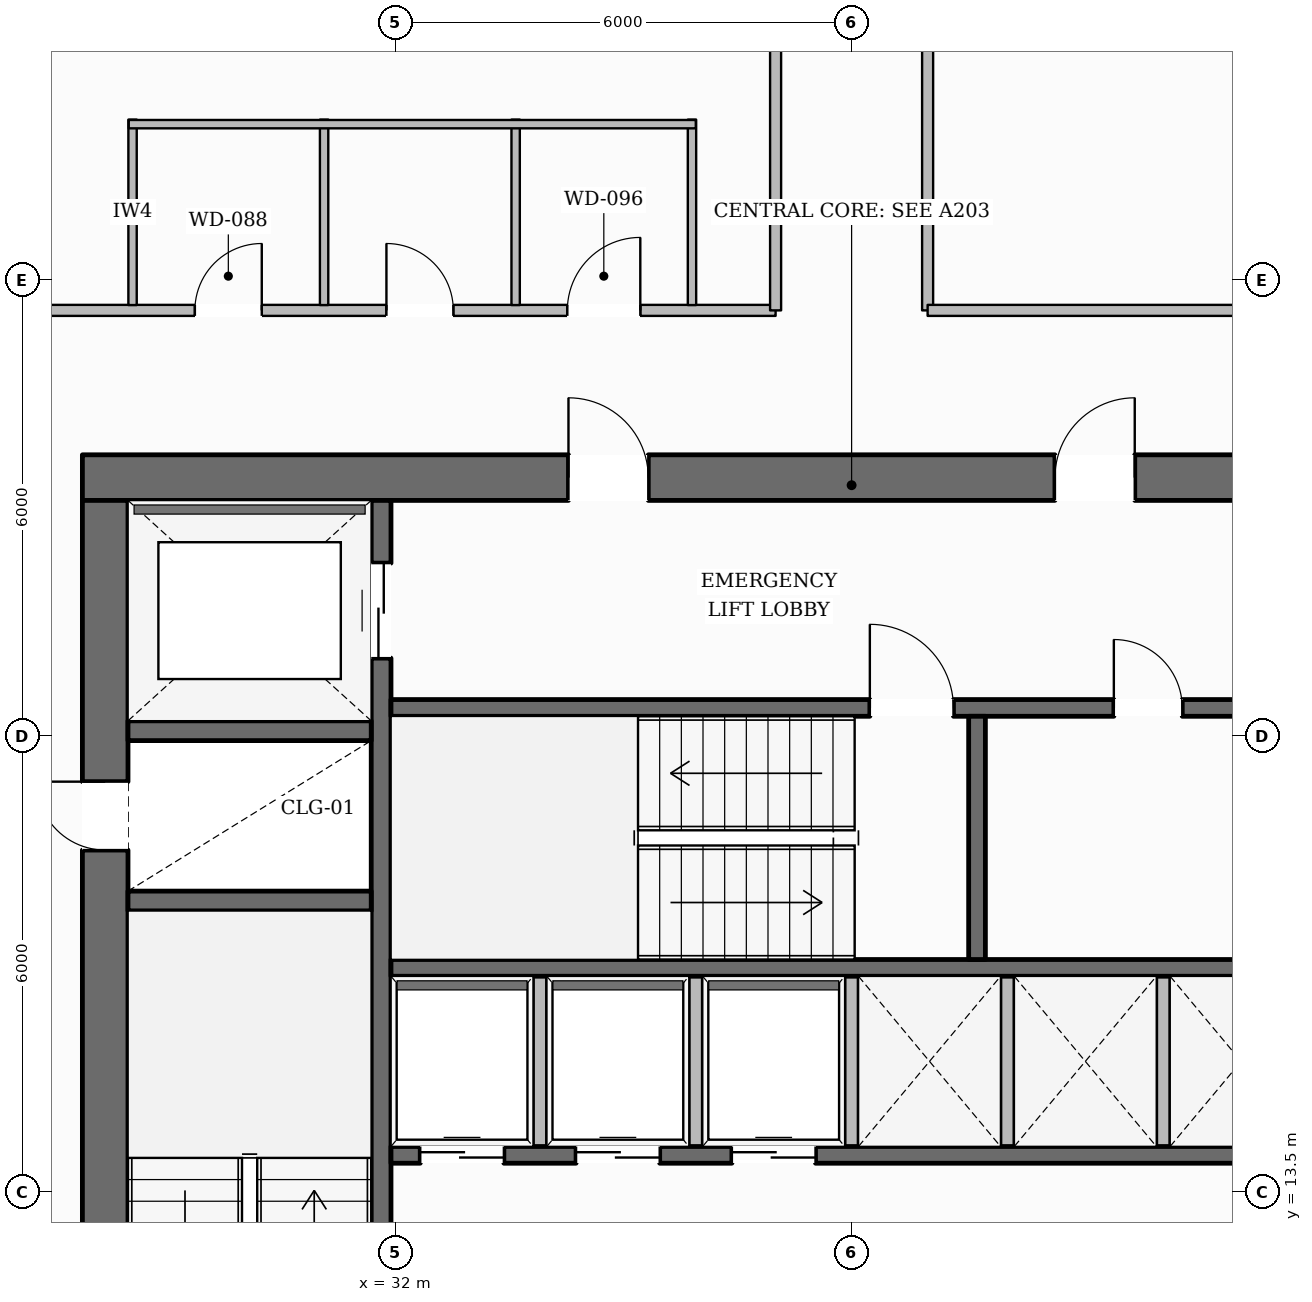
"""IFC4 building model, lengths in metres.
Left out: names, types, materials, properties, quantities, classifications, styles, units other than length and angle.
Written with IfcOpenShell. Run it as: python <this file> out.ifc"""

import sys

from ifc_helpers import new_model, si_unit, direction, frame, frame_2d, origin, place, context, subcontext, project, spatial, rectangle, extrude, element, fill, save


model = new_model("IFC4")
c1 = context("Model", 3, precision=1e-05, world=origin(), true_north=direction((0.0, 1.0)))
c2 = subcontext(c1, "Body", "Model", "MODEL_VIEW")
j1 = project(units=[si_unit("LENGTHUNIT", "METRE"), si_unit("PLANEANGLEUNIT", "RADIAN")], contexts=[c1])
p1 = place(None, origin())
s1 = spatial("IfcSite", under=j1, at=p1, CompositionType="ELEMENT")
p2 = place(p1, origin())
s2 = spatial("IfcBuilding", under=s1, at=p2, CompositionType="ELEMENT")
p3 = place(p2, frame((0.0, 0.0, 63.75)))
s3 = spatial("IfcBuildingStorey", under=s2, at=p3, CompositionType="ELEMENT", Elevation=63.75)
p4 = place(p3, frame((27.88, 22.9, 0.0), z_axis=(0.0, 0.0, 1.0), x_axis=(1.0, 0.0, 0.0)))
e1 = element("IfcWall", 1, at=p4, inside=s3, PredefinedType="SOLIDWALL", context=c2, shape_type="SweptSolid", body=[
    extrude(rectangle(XDim=20.24, YDim=0.6, at=frame_2d((10.12, 0.0))), origin(), (0.0, 0.0, 1.0), 3.59),
])
p5 = place(p4, frame((6.395, 0.0, 0.0)))
e2 = element("IfcOpeningElement", 2, at=p5, cuts=e1, PredefinedType="OPENING", context=c2, shape_type="SweptSolid", body=[
    extrude(rectangle(XDim=1.05, YDim=2.15, at=frame_2d((0.525, 1.075))), frame((0.0, 0.31, 0.0), z_axis=(0.0, -1.0, 0.0), x_axis=(1.0, 0.0, 0.0)), (0.0, 0.0, 1.0), 0.62),
])
p6 = place(p4, frame((12.795, 0.0, 0.0)))
e3 = element("IfcOpeningElement", 3, at=p6, cuts=e1, PredefinedType="OPENING", context=c2, shape_type="SweptSolid", body=[
    extrude(rectangle(XDim=1.05, YDim=2.15, at=frame_2d((0.525, 1.075))), frame((0.0, 0.31, 0.0), z_axis=(0.0, -1.0, 0.0), x_axis=(1.0, 0.0, 0.0)), (0.0, 0.0, 1.0), 0.62),
])
p7 = place(p3, frame((28.18, 9.6, 0.0), z_axis=(0.0, 0.0, 1.0), x_axis=(0.0, 1.0, 0.0)))
e4 = element("IfcWall", 4, at=p7, inside=s3, PredefinedType="SOLIDWALL", context=c2, shape_type="SweptSolid", body=[
    extrude(rectangle(XDim=13.0, YDim=0.6, at=frame_2d((6.5, 0.0))), origin(), (0.0, 0.0, 1.0), 3.59),
])
p8 = place(p7, frame((0.2, 0.0, 0.0)))
e5 = element("IfcOpeningElement", 5, at=p8, cuts=e4, PredefinedType="OPENING", context=c2, shape_type="SweptSolid", body=[
    extrude(rectangle(XDim=1.1, YDim=2.15, at=frame_2d((0.55, 1.075))), frame((0.0, 0.31, 0.0), z_axis=(0.0, -1.0, 0.0), x_axis=(1.0, 0.0, 0.0)), (0.0, 0.0, 1.0), 0.62),
])
p9 = place(p7, frame((8.4, 0.0, 0.0)))
e6 = element("IfcOpeningElement", 6, at=p9, cuts=e4, PredefinedType="OPENING", context=c2, shape_type="SweptSolid", body=[
    extrude(rectangle(XDim=0.9, YDim=2.1, at=frame_2d((0.45, 1.05))), frame((0.0, 0.31, 0.0), z_axis=(0.0, -1.0, 0.0), x_axis=(1.0, 0.0, 0.0)), (0.0, 0.0, 1.0), 0.62),
])
p10 = place(p3, frame((31.81, 9.6, 0.0), z_axis=(0.0, 0.0, 1.0), x_axis=(0.0, 1.0, 0.0)))
e7 = element("IfcWall", 7, at=p10, inside=s3, PredefinedType="SHEAR", context=c2, shape_type="SweptSolid", body=[
    extrude(rectangle(XDim=13.0, YDim=0.26, at=frame_2d((6.5, 0.0))), origin(), (0.0, 0.0, 1.0), 3.59),
])
p11 = place(p10, frame((10.925, 0.0, 0.0)))
e8 = element("IfcOpeningElement", 8, at=p11, cuts=e7, PredefinedType="OPENING", context=c2, shape_type="SweptSolid", body=[
    extrude(rectangle(XDim=1.25, YDim=2.25, at=frame_2d((0.625, 1.125))), frame((0.0, 0.14, 0.0), z_axis=(0.0, -1.0, 0.0), x_axis=(1.0, 0.0, 0.0)), (0.0, 0.0, 1.0), 0.28),
])
for number, where, z_axis, x_axis in (
    (9, (28.48, 17.33, 0.0), (0.0, 0.0, 1.0), (1.0, 0.0, 0.0)),
    (10, (28.48, 19.57, 0.0), (0.0, 0.0, 1.0), (1.0, 0.0, 0.0)),
):
    element("IfcWall", number, at=place(p3, frame(where, z_axis=z_axis, x_axis=x_axis)), inside=s3, PredefinedType="SHEAR", context=c2, shape_type="SweptSolid", body=[
        extrude(rectangle(XDim=3.2, YDim=0.26, at=frame_2d((1.6, 0.0))), origin(), (0.0, 0.0, 1.0), 3.59),
    ])
p12 = place(p3, frame((31.94, 19.87, 0.0), z_axis=(0.0, 0.0, 1.0), x_axis=(1.0, 0.0, 0.0)))
e11 = element("IfcWall", 11, at=p12, inside=s3, PredefinedType="SOLIDWALL", context=c2, shape_type="SweptSolid", body=[
    extrude(rectangle(XDim=12.12, YDim=0.22, at=frame_2d((6.06, 0.0))), origin(), (0.0, 0.0, 1.0), 3.59),
])
p13 = place(p12, frame((6.3, 0.0, 0.0)))
e12 = element("IfcOpeningElement", 12, at=p13, cuts=e11, PredefinedType="OPENING", context=c2, shape_type="SweptSolid", body=[
    extrude(rectangle(XDim=1.1, YDim=2.15, at=frame_2d((0.55, 1.075))), frame((0.0, 0.12, 0.0), z_axis=(0.0, -1.0, 0.0), x_axis=(1.0, 0.0, 0.0)), (0.0, 0.0, 1.0), 0.24),
])
p14 = place(p12, frame((9.51, 0.0, 0.0)))
e13 = element("IfcOpeningElement", 13, at=p14, cuts=e11, PredefinedType="OPENING", context=c2, shape_type="SweptSolid", body=[
    extrude(rectangle(XDim=0.9, YDim=2.1, at=frame_2d((0.45, 1.05))), frame((0.0, 0.12, 0.0), z_axis=(0.0, -1.0, 0.0), x_axis=(1.0, 0.0, 0.0)), (0.0, 0.0, 1.0), 0.24),
])
p15 = place(p3, frame((31.94, 16.45, 0.0), z_axis=(0.0, 0.0, 1.0), x_axis=(1.0, 0.0, 0.0)))
e14 = element("IfcWall", 14, at=p15, inside=s3, PredefinedType="SOLIDWALL", context=c2, shape_type="SweptSolid", body=[
    extrude(rectangle(XDim=12.12, YDim=0.22, at=frame_2d((6.06, 0.0))), origin(), (0.0, 0.0, 1.0), 3.59),
])
p16 = place(p3, frame((39.65, 16.56, 0.0), z_axis=(0.0, 0.0, 1.0), x_axis=(0.0, 1.0, 0.0)))
e15 = element("IfcWall", 15, at=p16, inside=s3, PredefinedType="SOLIDWALL", context=c2, shape_type="SweptSolid", body=[
    extrude(rectangle(XDim=3.2, YDim=0.22, at=frame_2d((1.6, 0.0))), origin(), (0.0, 0.0, 1.0), 3.59),
])
p17 = place(p3, frame((31.94, 13.99, 0.0), z_axis=(0.0, 0.0, 1.0), x_axis=(1.0, 0.0, 0.0)))
e16 = element("IfcWall", 16, at=p17, inside=s3, PredefinedType="SOLIDWALL", context=c2, shape_type="SweptSolid", body=[
    extrude(rectangle(XDim=12.12, YDim=0.22, at=frame_2d((6.06, 0.0))), origin(), (0.0, 0.0, 1.0), 3.59),
])
p18 = place(p17, frame((0.385, 0.0, 0.0)))
e17 = element("IfcOpeningElement", 17, at=p18, cuts=e16, PredefinedType="OPENING", context=c2, shape_type="SweptSolid", body=[
    extrude(rectangle(XDim=1.1, YDim=2.2, at=frame_2d((0.55, 1.1))), frame((0.0, 0.12, 0.0), z_axis=(0.0, -1.0, 0.0), x_axis=(1.0, 0.0, 0.0)), (0.0, 0.0, 1.0), 0.24),
])
p19 = place(p17, frame((2.435, 0.0, 0.0)))
e18 = element("IfcOpeningElement", 18, at=p19, cuts=e16, PredefinedType="OPENING", context=c2, shape_type="SweptSolid", body=[
    extrude(rectangle(XDim=1.1, YDim=2.2, at=frame_2d((0.55, 1.1))), frame((0.0, 0.12, 0.0), z_axis=(0.0, -1.0, 0.0), x_axis=(1.0, 0.0, 0.0)), (0.0, 0.0, 1.0), 0.24),
])
p20 = place(p17, frame((4.485, 0.0, 0.0)))
e19 = element("IfcOpeningElement", 19, at=p20, cuts=e16, PredefinedType="OPENING", context=c2, shape_type="SweptSolid", body=[
    extrude(rectangle(XDim=1.1, YDim=2.2, at=frame_2d((0.55, 1.1))), frame((0.0, 0.12, 0.0), z_axis=(0.0, -1.0, 0.0), x_axis=(1.0, 0.0, 0.0)), (0.0, 0.0, 1.0), 0.24),
])
p21 = place(p3, frame((12.6, 13.478, 0.0), z_axis=(0.0, 0.0, 1.0), x_axis=(0.505426781382, 0.862869496889, 0.0)))
e20 = element("IfcWall", 20, at=p21, inside=s3, PredefinedType="STANDARD", context=c2, shape_type="SweptSolid", body=[
    extrude(rectangle(XDim=35.985, YDim=0.38, at=frame_2d((17.992, 0.0))), origin(), (0.0, 0.0, 1.0), 2.97),
])
p22 = place(p21, frame((31.766, 0.0, 0.65)))
e21 = element("IfcOpeningElement", 21, at=p22, cuts=e20, PredefinedType="OPENING", context=c2, shape_type="SweptSolid", body=[
    extrude(rectangle(XDim=1.65, YDim=1.75, at=frame_2d((0.825, 0.875))), frame((0.0, 0.2, 0.0), z_axis=(0.0, -1.0, 0.0), x_axis=(1.0, 0.0, 0.0)), (0.0, 0.0, 1.0), 0.4),
])
p23 = place(p21, frame((25.928, 0.0, 0.65)))
e22 = element("IfcOpeningElement", 22, at=p23, cuts=e20, PredefinedType="OPENING", context=c2, shape_type="SweptSolid", body=[
    extrude(rectangle(XDim=1.65, YDim=1.75, at=frame_2d((0.825, 0.875))), frame((0.0, 0.2, 0.0), z_axis=(0.0, -1.0, 0.0), x_axis=(1.0, 0.0, 0.0)), (0.0, 0.0, 1.0), 0.4),
])
p24 = place(p21, frame((8.413, 0.0, 0.65)))
e23 = element("IfcOpeningElement", 23, at=p24, cuts=e20, PredefinedType="OPENING", context=c2, shape_type="SweptSolid", body=[
    extrude(rectangle(XDim=1.65, YDim=1.75, at=frame_2d((0.825, 0.875))), frame((0.0, 0.2, 0.0), z_axis=(0.0, -1.0, 0.0), x_axis=(1.0, 0.0, 0.0)), (0.0, 0.0, 1.0), 0.4),
])
p25 = place(p21, frame((2.574, 0.0, 0.65)))
e24 = element("IfcOpeningElement", 24, at=p25, cuts=e20, PredefinedType="OPENING", context=c2, shape_type="SweptSolid", body=[
    extrude(rectangle(XDim=1.65, YDim=1.75, at=frame_2d((0.825, 0.875))), frame((0.0, 0.2, 0.0), z_axis=(0.0, -1.0, 0.0), x_axis=(1.0, 0.0, 0.0)), (0.0, 0.0, 1.0), 0.4),
])
for number, where, z_axis, x_axis in (
    (25, (33.9, 14.1, 0.0), (0.0, 0.0, 1.0), (0.0, 1.0, 0.0)),
    (26, (35.95, 14.1, 0.0), (0.0, 0.0, 1.0), (0.0, 1.0, 0.0)),
    (27, (38.0, 14.1, 0.0), (0.0, 0.0, 1.0), (0.0, 1.0, 0.0)),
    (28, (40.05, 14.1, 0.0), (0.0, 0.0, 1.0), (0.0, 1.0, 0.0)),
    (29, (42.1, 14.1, 0.0), (0.0, 0.0, 1.0), (0.0, 1.0, 0.0)),
):
    element("IfcWall", number, at=place(p3, frame(where, z_axis=z_axis, x_axis=x_axis)), inside=s3, PredefinedType="PARTITIONING", context=c2, shape_type="SweptSolid", body=[
        extrude(rectangle(XDim=2.24, YDim=0.165, at=frame_2d((1.12, 0.0))), origin(), (0.0, 0.0, 1.0), 3.59),
    ])
p26 = place(p3, frame((25.98, 25.1, 0.0), z_axis=(0.0, 0.0, 1.0), x_axis=(1.0, 0.0, 0.0)))
e30 = element("IfcWall", 30, at=p26, inside=s3, PredefinedType="PARTITIONING", context=c2, shape_type="SweptSolid", body=[
    extrude(rectangle(XDim=11.02, YDim=0.145, at=frame_2d((5.51, 0.0))), origin(), (0.0, 0.0, 1.0), 3.59),
])
p27 = place(p26, frame((3.38, 0.0, 0.0)))
e31 = element("IfcOpeningElement", 31, at=p27, cuts=e30, PredefinedType="OPENING", context=c2, shape_type="SweptSolid", body=[
    extrude(rectangle(XDim=0.88, YDim=2.1, at=frame_2d((0.44, 1.05))), frame((0.0, 0.083, 0.0), z_axis=(0.0, -1.0, 0.0), x_axis=(1.0, 0.0, 0.0)), (0.0, 0.0, 1.0), 0.165),
])
p28 = place(p26, frame((5.9, 0.0, 0.0)))
e32 = element("IfcOpeningElement", 32, at=p28, cuts=e30, PredefinedType="OPENING", context=c2, shape_type="SweptSolid", body=[
    extrude(rectangle(XDim=0.88, YDim=2.1, at=frame_2d((0.44, 1.05))), frame((0.0, 0.083, 0.0), z_axis=(0.0, -1.0, 0.0), x_axis=(1.0, 0.0, 0.0)), (0.0, 0.0, 1.0), 0.165),
])
p29 = place(p26, frame((8.28, 0.0, 0.0)))
e33 = element("IfcOpeningElement", 33, at=p29, cuts=e30, PredefinedType="OPENING", context=c2, shape_type="SweptSolid", body=[
    extrude(rectangle(XDim=0.96, YDim=2.1, at=frame_2d((0.48, 1.05))), frame((0.0, 0.083, 0.0), z_axis=(0.0, -1.0, 0.0), x_axis=(1.0, 0.0, 0.0)), (0.0, 0.0, 1.0), 0.165),
])
p30 = place(p3, frame((37.0, 25.1, 0.0), z_axis=(0.0, 0.0, 1.0), x_axis=(0.0, 1.0, 0.0)))
e34 = element("IfcWall", 34, at=p30, inside=s3, PredefinedType="PARTITIONING", context=c2, shape_type="SweptSolid", body=[
    extrude(rectangle(XDim=13.1, YDim=0.145, at=frame_2d((6.55, 0.0))), origin(), (0.0, 0.0, 1.0), 3.59),
])
p31 = place(p30, frame((5.85, 0.0, 0.0)))
e35 = element("IfcOpeningElement", 35, at=p31, cuts=e34, PredefinedType="OPENING", context=c2, shape_type="SweptSolid", body=[
    extrude(rectangle(XDim=1.4, YDim=2.2, at=frame_2d((0.7, 1.1))), frame((0.0, 0.083, 0.0), z_axis=(0.0, -1.0, 0.0), x_axis=(1.0, 0.0, 0.0)), (0.0, 0.0, 1.0), 0.165),
])
p32 = place(p3, frame((39.0, 38.2, 0.0), z_axis=(0.0, 0.0, 1.0), x_axis=(0.0, -1.0, 0.0)))
e36 = element("IfcWall", 36, at=p32, inside=s3, PredefinedType="PARTITIONING", context=c2, shape_type="SweptSolid", body=[
    extrude(rectangle(XDim=13.1, YDim=0.145, at=frame_2d((6.55, 0.0))), origin(), (0.0, 0.0, 1.0), 3.59),
])
p33 = place(p3, frame((39.0, 25.1, 0.0), z_axis=(0.0, 0.0, 1.0), x_axis=(1.0, 0.0, 0.0)))
e37 = element("IfcWall", 37, at=p33, inside=s3, PredefinedType="PARTITIONING", context=c2, shape_type="SweptSolid", body=[
    extrude(rectangle(XDim=11.02, YDim=0.145, at=frame_2d((5.51, 0.0))), origin(), (0.0, 0.0, 1.0), 3.59),
])
for number, where, z_axis, x_axis in (
    (38, (28.54, 25.17, 0.0), (0.0, 0.0, 1.0), (0.0, 1.0, 0.0)),
    (39, (31.06, 25.17, 0.0), (0.0, 0.0, 1.0), (0.0, 1.0, 0.0)),
    (40, (33.58, 25.17, 0.0), (0.0, 0.0, 1.0), (0.0, 1.0, 0.0)),
    (41, (35.9, 25.17, 0.0), (0.0, 0.0, 1.0), (0.0, 1.0, 0.0)),
):
    element("IfcWall", number, at=place(p3, frame(where, z_axis=z_axis, x_axis=x_axis)), inside=s3, PredefinedType="PLUMBINGWALL", context=c2, shape_type="SweptSolid", body=[
        extrude(rectangle(XDim=2.44, YDim=0.11, at=frame_2d((1.22, 0.0))), origin(), (0.0, 0.0, 1.0), 3.59),
    ])
p34 = place(p3, frame((28.49, 27.55, 0.0), z_axis=(0.0, 0.0, 1.0), x_axis=(1.0, 0.0, 0.0)))
e42 = element("IfcWall", 42, at=p34, inside=s3, PredefinedType="PLUMBINGWALL", context=c2, shape_type="SweptSolid", body=[
    extrude(rectangle(XDim=7.46, YDim=0.11, at=frame_2d((3.73, 0.0))), origin(), (0.0, 0.0, 1.0), 3.59),
])
p35 = place(p13, origin())
e43 = element("IfcDoor", 43, at=p35, inside=s3, OperationType="SINGLE_SWING_LEFT", PredefinedType="DOOR", context=c2, shape_type="SweptSolid", body=[
    extrude(rectangle(XDim=1.1, YDim=2.15, at=frame_2d((0.55, 1.075))), frame((0.0, 0.025, 0.0), z_axis=(0.0, -1.0, 0.0), x_axis=(1.0, 0.0, 0.0)), (0.0, 0.0, 1.0), 0.05),
])
fill(e12, e43)
p36 = place(p9, origin())
e44 = element("IfcDoor", 44, at=p36, inside=s3, OperationType="SINGLE_SWING_RIGHT", PredefinedType="DOOR", context=c2, shape_type="SweptSolid", body=[
    extrude(rectangle(XDim=0.9, YDim=2.1, at=frame_2d((0.45, 1.05))), frame((0.0, 0.025, 0.0), z_axis=(0.0, -1.0, 0.0), x_axis=(1.0, 0.0, 0.0)), (0.0, 0.0, 1.0), 0.05),
])
fill(e6, e44)
p37 = place(p5, origin())
e45 = element("IfcDoor", 45, at=p37, inside=s3, OperationType="SINGLE_SWING_LEFT", PredefinedType="DOOR", context=c2, shape_type="SweptSolid", body=[
    extrude(rectangle(XDim=1.05, YDim=2.15, at=frame_2d((0.525, 1.075))), frame((0.0, 0.025, 0.0), z_axis=(0.0, -1.0, 0.0), x_axis=(1.0, 0.0, 0.0)), (0.0, 0.0, 1.0), 0.05),
])
fill(e2, e45)
p38 = place(p6, origin())
e46 = element("IfcDoor", 46, at=p38, inside=s3, OperationType="SINGLE_SWING_RIGHT", PredefinedType="DOOR", context=c2, shape_type="SweptSolid", body=[
    extrude(rectangle(XDim=1.05, YDim=2.15, at=frame_2d((0.525, 1.075))), frame((0.0, 0.025, 0.0), z_axis=(0.0, -1.0, 0.0), x_axis=(1.0, 0.0, 0.0)), (0.0, 0.0, 1.0), 0.05),
])
fill(e3, e46)
p39 = place(p11, origin())
e47 = element("IfcDoor", 47, at=p39, inside=s3, OperationType="DOUBLE_DOOR_SLIDING", PredefinedType="DOOR", context=c2, shape_type="SweptSolid", body=[
    extrude(rectangle(XDim=1.25, YDim=2.25, at=frame_2d((0.625, 1.125))), frame((0.0, 0.025, 0.0), z_axis=(0.0, -1.0, 0.0), x_axis=(1.0, 0.0, 0.0)), (0.0, 0.0, 1.0), 0.05),
])
fill(e8, e47)
p40 = place(p18, origin())
e48 = element("IfcDoor", 48, at=p40, inside=s3, OperationType="DOUBLE_DOOR_SLIDING", PredefinedType="DOOR", context=c2, shape_type="SweptSolid", body=[
    extrude(rectangle(XDim=1.1, YDim=2.2, at=frame_2d((0.55, 1.1))), frame((0.0, 0.025, 0.0), z_axis=(0.0, -1.0, 0.0), x_axis=(1.0, 0.0, 0.0)), (0.0, 0.0, 1.0), 0.05),
])
fill(e17, e48)
p41 = place(p19, origin())
e49 = element("IfcDoor", 49, at=p41, inside=s3, OperationType="DOUBLE_DOOR_SLIDING", PredefinedType="DOOR", context=c2, shape_type="SweptSolid", body=[
    extrude(rectangle(XDim=1.1, YDim=2.2, at=frame_2d((0.55, 1.1))), frame((0.0, 0.025, 0.0), z_axis=(0.0, -1.0, 0.0), x_axis=(1.0, 0.0, 0.0)), (0.0, 0.0, 1.0), 0.05),
])
fill(e18, e49)
p42 = place(p20, origin())
e50 = element("IfcDoor", 50, at=p42, inside=s3, OperationType="DOUBLE_DOOR_SLIDING", PredefinedType="DOOR", context=c2, shape_type="SweptSolid", body=[
    extrude(rectangle(XDim=1.1, YDim=2.2, at=frame_2d((0.55, 1.1))), frame((0.0, 0.025, 0.0), z_axis=(0.0, -1.0, 0.0), x_axis=(1.0, 0.0, 0.0)), (0.0, 0.0, 1.0), 0.05),
])
fill(e19, e50)
p43 = place(p14, origin())
e51 = element("IfcDoor", 51, at=p43, inside=s3, OperationType="SINGLE_SWING_LEFT", PredefinedType="DOOR", context=c2, shape_type="SweptSolid", body=[
    extrude(rectangle(XDim=0.9, YDim=2.1, at=frame_2d((0.45, 1.05))), frame((0.0, 0.025, 0.0), z_axis=(0.0, -1.0, 0.0), x_axis=(1.0, 0.0, 0.0)), (0.0, 0.0, 1.0), 0.05),
])
fill(e13, e51)
p44 = place(p27, origin())
e52 = element("IfcDoor", 52, at=p44, inside=s3, OperationType="SINGLE_SWING_RIGHT", PredefinedType="DOOR", context=c2, shape_type="SweptSolid", body=[
    extrude(rectangle(XDim=0.88, YDim=2.1, at=frame_2d((0.44, 1.05))), frame((0.0, 0.025, 0.0), z_axis=(0.0, -1.0, 0.0), x_axis=(1.0, 0.0, 0.0)), (0.0, 0.0, 1.0), 0.05),
])
fill(e31, e52)
p45 = place(p28, origin())
e53 = element("IfcDoor", 53, at=p45, inside=s3, OperationType="SINGLE_SWING_LEFT", PredefinedType="DOOR", context=c2, shape_type="SweptSolid", body=[
    extrude(rectangle(XDim=0.88, YDim=2.1, at=frame_2d((0.44, 1.05))), frame((0.0, 0.025, 0.0), z_axis=(0.0, -1.0, 0.0), x_axis=(1.0, 0.0, 0.0)), (0.0, 0.0, 1.0), 0.05),
])
fill(e32, e53)
p46 = place(p29, origin())
e54 = element("IfcDoor", 54, at=p46, inside=s3, OperationType="SINGLE_SWING_RIGHT", PredefinedType="DOOR", context=c2, shape_type="SweptSolid", body=[
    extrude(rectangle(XDim=0.96, YDim=2.1, at=frame_2d((0.48, 1.05))), frame((0.0, 0.025, 0.0), z_axis=(0.0, -1.0, 0.0), x_axis=(1.0, 0.0, 0.0)), (0.0, 0.0, 1.0), 0.05),
])
fill(e33, e54)
save(model, sys.argv[1])
